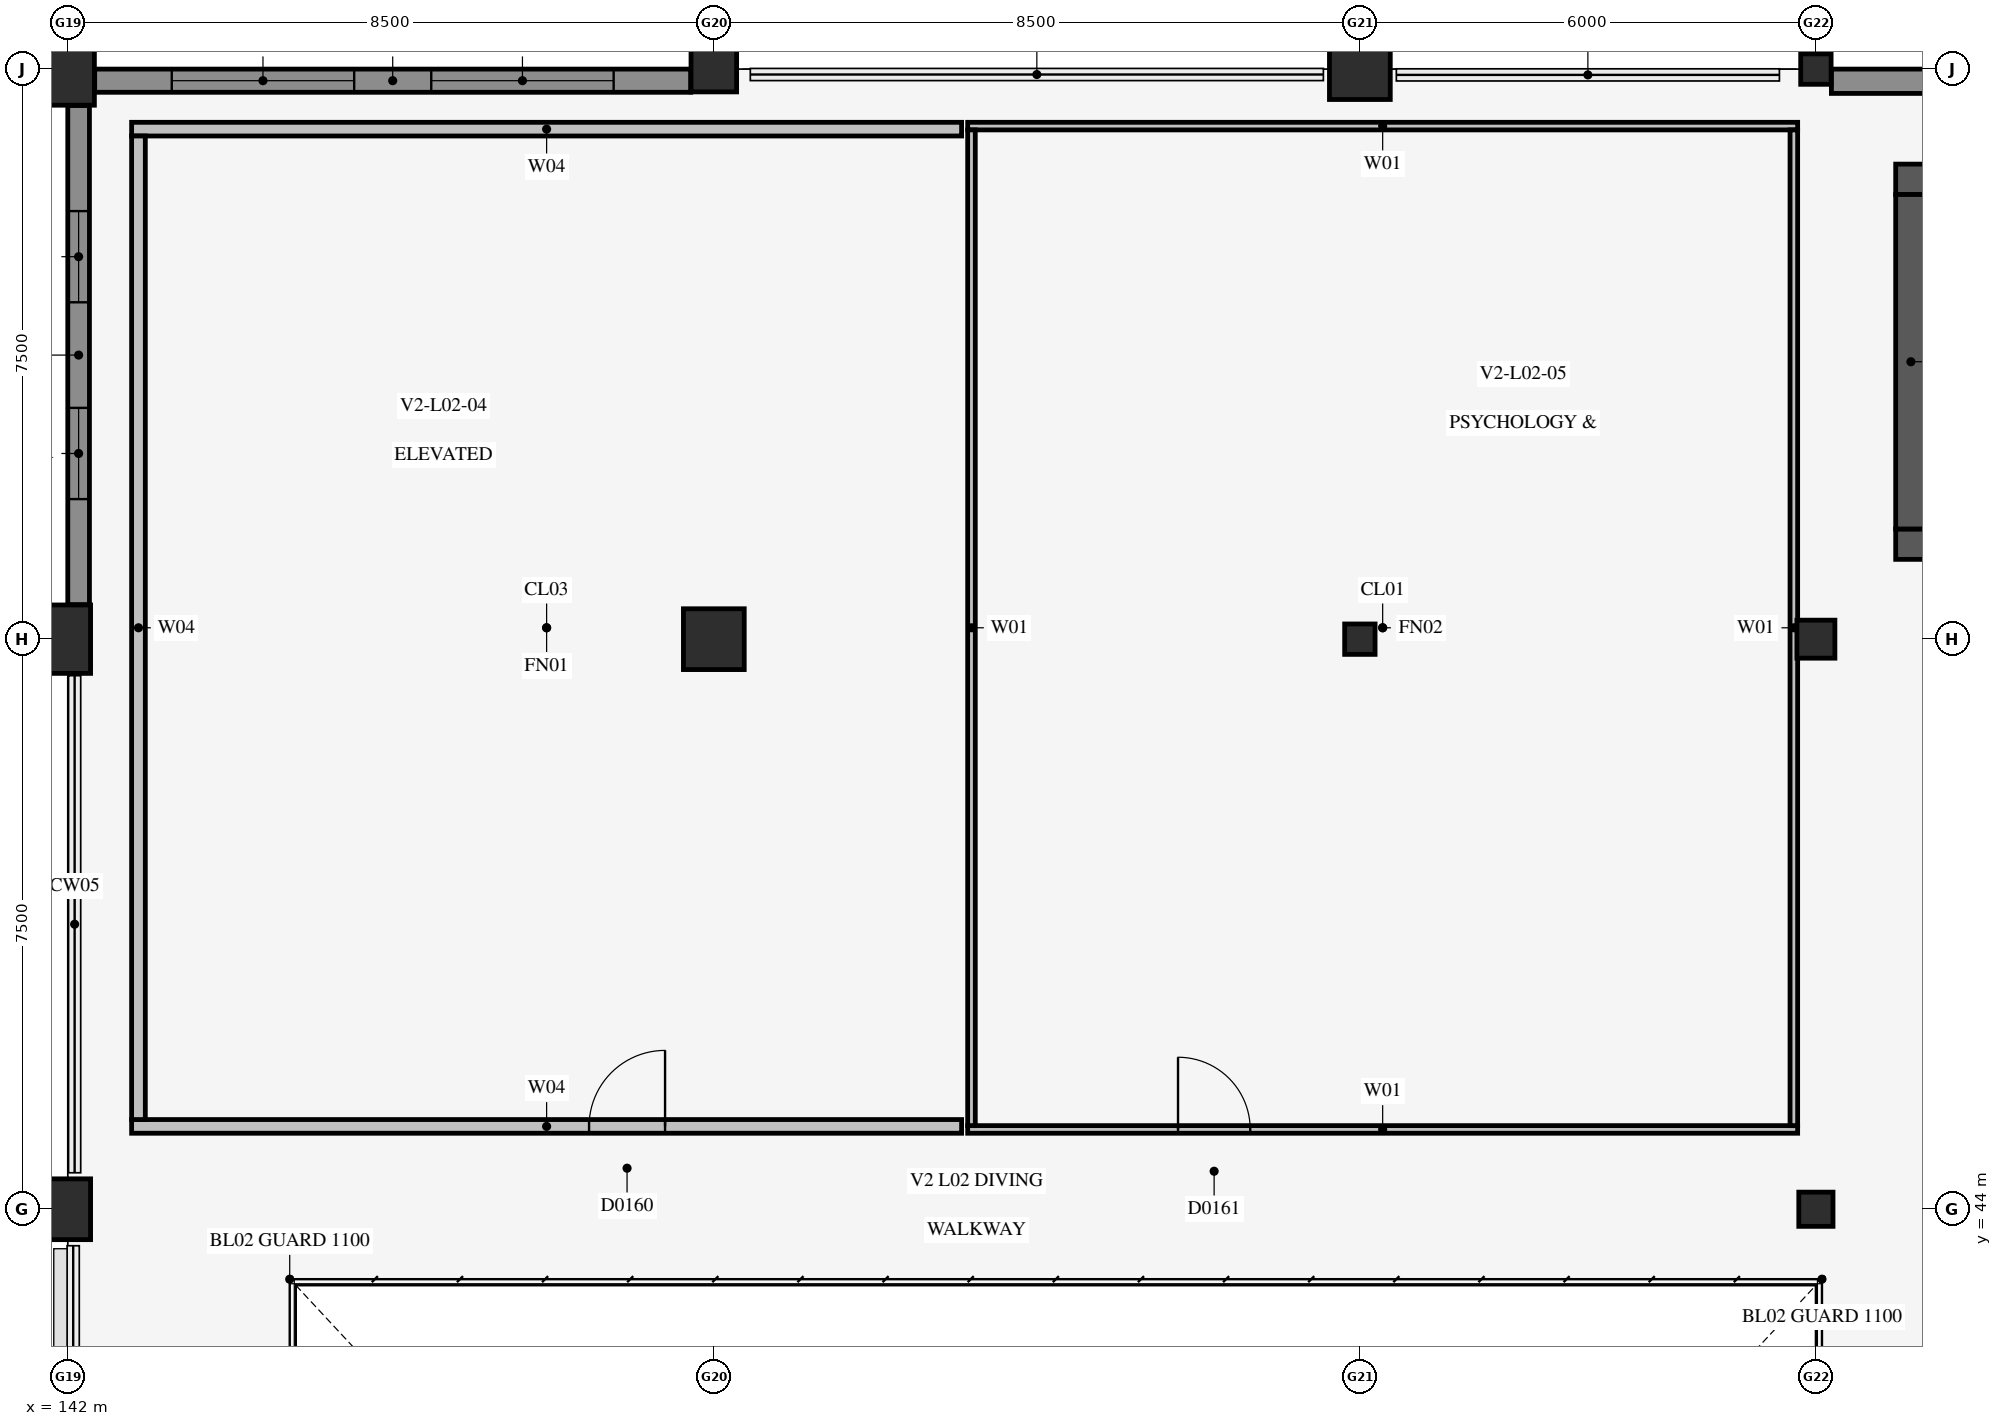
"""IFC4 building model, lengths in metres.
Left out: names, types, materials, properties, quantities, classifications, styles, units other than length and angle.
Written with IfcOpenShell. Run it as: python <this file> out.ifc"""

import sys

from ifc_helpers import new_model, si_unit, direction, frame, frame_2d, origin, origin_2d, place, context, subcontext, project, spatial, rectangle, circle, extrude, element, fill, save


model = new_model("IFC4")
c1 = context("Model", 3, precision=1e-05, world=origin(), true_north=direction((0.0, 1.0)))
c2 = subcontext(c1, "Body", "Model", "MODEL_VIEW")
j1 = project(units=[si_unit("LENGTHUNIT", "METRE"), si_unit("PLANEANGLEUNIT", "RADIAN")], contexts=[c1])
p1 = place(None, origin())
s1 = spatial("IfcSite", under=j1, at=p1, CompositionType="ELEMENT")
p2 = place(p1, origin())
s2 = spatial("IfcBuilding", under=s1, at=p2, CompositionType="ELEMENT")
p3 = place(p2, frame((0.0, 0.0, 10.2)))
s3 = spatial("IfcBuildingStorey", under=s2, at=p3, CompositionType="ELEMENT", Elevation=10.2)
p4 = place(p3, frame((166.05, 52.75, 0.0), z_axis=(0.0, 0.0, 1.0), x_axis=(1.0, 0.0, 0.0)))
e1 = element("IfcWall", 1, at=p4, inside=s3, PredefinedType="SHEAR", context=c2, shape_type="SweptSolid", body=[
    extrude(rectangle(XDim=9.5, YDim=0.4, at=frame_2d((4.75, 0.0))), origin(), (0.0, 0.0, 1.0), 4.38),
])
p5 = place(p4, frame((0.48, 0.0, 0.0)))
e2 = element("IfcOpeningElement", 2, at=p5, cuts=e1, PredefinedType="OPENING", context=c2, shape_type="SweptSolid", body=[
    extrude(rectangle(XDim=1.5, YDim=2.3, at=frame_2d((0.75, 1.15))), frame((0.0, 0.212, 0.0), z_axis=(0.0, -1.0, 0.0), x_axis=(1.0, 0.0, 0.0)), (0.0, 0.0, 1.0), 0.424),
])
p6 = place(p3, frame((166.05, 57.55, 0.0), z_axis=(0.0, 0.0, 1.0), x_axis=(1.0, 0.0, 0.0)))
e3 = element("IfcWall", 3, at=p6, inside=s3, PredefinedType="SHEAR", context=c2, shape_type="SweptSolid", body=[
    extrude(rectangle(XDim=9.5, YDim=0.4, at=frame_2d((4.75, 0.0))), origin(), (0.0, 0.0, 1.0), 4.38),
])
p7 = place(p3, frame((166.25, 52.95, 0.0), z_axis=(0.0, 0.0, 1.0), x_axis=(0.0, 1.0, 0.0)))
e4 = element("IfcWall", 4, at=p7, inside=s3, PredefinedType="SHEAR", context=c2, shape_type="SweptSolid", body=[
    extrude(rectangle(XDim=4.4, YDim=0.4, at=frame_2d((2.2, 0.0))), origin(), (0.0, 0.0, 1.0), 4.38),
])
p8 = place(p3, frame((142.0, 44.0, 0.0), z_axis=(0.0, 0.0, 1.0), x_axis=(1.0, 0.0, 0.0)))
e5 = element("IfcColumn", 5, at=p8, inside=s3, PredefinedType="COLUMN", context=c2, shape_type="SweptSolid", body=[
    extrude(rectangle(XDim=0.6, YDim=0.8, at=origin_2d()), origin(), (0.0, 0.0, 1.0), 4.6),
])
p9 = place(p3, frame((142.0, 51.5, 0.0), z_axis=(0.0, 0.0, 1.0), x_axis=(1.0, 0.0, 0.0)))
e6 = element("IfcColumn", 6, at=p9, inside=s3, PredefinedType="COLUMN", context=c2, shape_type="SweptSolid", body=[
    extrude(rectangle(XDim=0.6, YDim=0.9, at=origin_2d()), origin(), (0.0, 0.0, 1.0), 4.6),
])
p10 = place(p3, frame((142.0, 59.0, 0.0), z_axis=(0.0, 0.0, 1.0), x_axis=(1.0, 0.0, 0.0)))
e7 = element("IfcColumn", 7, at=p10, inside=s3, PredefinedType="COLUMN", context=c2, shape_type="SweptSolid", body=[
    extrude(rectangle(XDim=0.7, YDim=0.95, at=origin_2d()), origin(), (0.0, 0.0, 1.0), 4.6),
])
p11 = place(p3, frame((150.5, 51.5, 0.0), z_axis=(0.0, 0.0, 1.0), x_axis=(1.0, 0.0, 0.0)))
e8 = element("IfcColumn", 8, at=p11, inside=s3, PredefinedType="COLUMN", context=c2, shape_type="SweptSolid", body=[
    extrude(circle(Radius=0.4, at=origin_2d()), origin(), (0.0, 0.0, 1.0), 4.6),
])
p12 = place(p3, frame((150.5, 59.0, 0.0), z_axis=(0.0, 0.0, 1.0), x_axis=(1.0, 0.0, 0.0)))
e9 = element("IfcColumn", 9, at=p12, inside=s3, PredefinedType="COLUMN", context=c2, shape_type="SweptSolid", body=[
    extrude(circle(Radius=0.3, at=origin_2d()), origin(), (0.0, 0.0, 1.0), 4.6),
])
p13 = place(p3, frame((159.0, 51.5, 0.0), z_axis=(0.0, 0.0, 1.0), x_axis=(1.0, 0.0, 0.0)))
e10 = element("IfcColumn", 10, at=p13, inside=s3, PredefinedType="COLUMN", context=c2, shape_type="SweptSolid", body=[
    extrude(rectangle(XDim=0.4, YDim=0.4, at=origin_2d()), origin(), (0.0, 0.0, 1.0), 4.6),
])
p14 = place(p3, frame((159.0, 59.0, 0.0), z_axis=(0.0, 0.0, 1.0), x_axis=(1.0, 0.0, 0.0)))
e11 = element("IfcColumn", 11, at=p14, inside=s3, PredefinedType="COLUMN", context=c2, shape_type="SweptSolid", body=[
    extrude(circle(Radius=0.4, at=origin_2d()), origin(), (0.0, 0.0, 1.0), 4.6),
])
p15 = place(p3, frame((165.0, 44.0, 0.0), z_axis=(0.0, 0.0, 1.0), x_axis=(1.0, 0.0, 0.0)))
e12 = element("IfcColumn", 12, at=p15, inside=s3, PredefinedType="COLUMN", context=c2, shape_type="SweptSolid", body=[
    extrude(rectangle(XDim=0.45, YDim=0.45, at=origin_2d()), origin(), (0.0, 0.0, 1.0), 4.6),
])
p16 = place(p3, frame((165.0, 51.5, 0.0), z_axis=(0.0, 0.0, 1.0), x_axis=(1.0, 0.0, 0.0)))
e13 = element("IfcColumn", 13, at=p16, inside=s3, PredefinedType="COLUMN", context=c2, shape_type="SweptSolid", body=[
    extrude(rectangle(XDim=0.5, YDim=0.5, at=origin_2d()), origin(), (0.0, 0.0, 1.0), 4.6),
])
p17 = place(p3, frame((165.0, 59.0, 0.0), z_axis=(0.0, 0.0, 1.0), x_axis=(1.0, 0.0, 0.0)))
e14 = element("IfcColumn", 14, at=p17, inside=s3, PredefinedType="COLUMN", context=c2, shape_type="SweptSolid", body=[
    extrude(rectangle(XDim=0.4, YDim=0.4, at=origin_2d()), origin(), (0.0, 0.0, 1.0), 4.6),
])
p18 = place(p3, frame((142.84, 45.09, 0.0), z_axis=(0.0, 0.0, 1.0), x_axis=(1.0, 0.0, 0.0)))
e15 = element("IfcWall", 15, at=p18, inside=s3, PredefinedType="PARTITIONING", context=c2, shape_type="SweptSolid", body=[
    extrude(rectangle(XDim=10.92, YDim=0.18, at=frame_2d((5.46, 0.0))), origin(), (0.0, 0.0, 1.0), 4.365),
])
p19 = place(p18, frame((6.018, 0.0, 0.0)))
e16 = element("IfcOpeningElement", 16, at=p19, cuts=e15, PredefinedType="OPENING", context=c2, shape_type="SweptSolid", body=[
    extrude(rectangle(XDim=1.0, YDim=2.2, at=frame_2d((0.5, 1.1))), frame((0.0, 0.102, 0.0), z_axis=(0.0, -1.0, 0.0), x_axis=(1.0, 0.0, 0.0)), (0.0, 0.0, 1.0), 0.204),
])
p20 = place(p3, frame((142.84, 58.21, 0.0), z_axis=(0.0, 0.0, 1.0), x_axis=(1.0, 0.0, 0.0)))
e17 = element("IfcWall", 17, at=p20, inside=s3, PredefinedType="PARTITIONING", context=c2, shape_type="SweptSolid", body=[
    extrude(rectangle(XDim=10.92, YDim=0.18, at=frame_2d((5.46, 0.0))), origin(), (0.0, 0.0, 1.0), 4.365),
])
p21 = place(p3, frame((142.93, 45.18, 0.0), z_axis=(0.0, 0.0, 1.0), x_axis=(0.0, 1.0, 0.0)))
e18 = element("IfcWall", 18, at=p21, inside=s3, PredefinedType="PARTITIONING", context=c2, shape_type="SweptSolid", body=[
    extrude(rectangle(XDim=12.94, YDim=0.18, at=frame_2d((6.47, 0.0))), origin(), (0.0, 0.0, 1.0), 4.365),
])
p22 = place(p3, frame((153.84, 45.05, 0.0), z_axis=(0.0, 0.0, 1.0), x_axis=(1.0, 0.0, 0.0)))
e19 = element("IfcWall", 19, at=p22, inside=s3, PredefinedType="PARTITIONING", context=c2, shape_type="SweptSolid", body=[
    extrude(rectangle(XDim=10.92, YDim=0.1, at=frame_2d((5.46, 0.0))), origin(), (0.0, 0.0, 1.0), 4.365),
])
p23 = place(p22, frame((2.768, 0.0, 0.0)))
e20 = element("IfcOpeningElement", 20, at=p23, cuts=e19, PredefinedType="OPENING", context=c2, shape_type="SweptSolid", body=[
    extrude(rectangle(XDim=0.95, YDim=2.15, at=frame_2d((0.475, 1.075))), frame((0.0, 0.062, 0.0), z_axis=(0.0, -1.0, 0.0), x_axis=(1.0, 0.0, 0.0)), (0.0, 0.0, 1.0), 0.124),
])
p24 = place(p3, frame((153.84, 58.25, 0.0), z_axis=(0.0, 0.0, 1.0), x_axis=(1.0, 0.0, 0.0)))
e21 = element("IfcWall", 21, at=p24, inside=s3, PredefinedType="PARTITIONING", context=c2, shape_type="SweptSolid", body=[
    extrude(rectangle(XDim=10.92, YDim=0.1, at=frame_2d((5.46, 0.0))), origin(), (0.0, 0.0, 1.0), 4.365),
])
for number, where, z_axis, x_axis in (
    (22, (164.71, 45.1, 0.0), (0.0, 0.0, 1.0), (0.0, 1.0, 0.0)),
    (23, (153.89, 45.1, 0.0), (0.0, 0.0, 1.0), (0.0, 1.0, 0.0)),
):
    element("IfcWall", number, at=place(p3, frame(where, z_axis=z_axis, x_axis=x_axis)), inside=s3, PredefinedType="PARTITIONING", context=c2, shape_type="SweptSolid", body=[
        extrude(rectangle(XDim=13.1, YDim=0.1, at=frame_2d((6.55, 0.0))), origin(), (0.0, 0.0, 1.0), 4.365),
    ])
p25 = place(p3, frame((142.354, 58.847, 0.0), z_axis=(0.0, 0.0, 1.0), x_axis=(1.0, 0.0, 0.0)))
e24 = element("IfcWall", 24, at=p25, inside=s3, PredefinedType="SOLIDWALL", context=c2, shape_type="SweptSolid", body=[
    extrude(rectangle(XDim=7.842, YDim=0.305, at=frame_2d((3.921, 0.0))), origin(), (0.0, 0.0, 1.0), 3.937),
])
p26 = place(p25, frame((1.014, 0.0, 0.95)))
e25 = element("IfcOpeningElement", 25, at=p26, cuts=e24, PredefinedType="OPENING", context=c2, shape_type="SweptSolid", body=[
    extrude(rectangle(XDim=2.4, YDim=1.2, at=frame_2d((1.2, 0.6))), frame((0.0, 0.165, 0.0), z_axis=(0.0, -1.0, 0.0), x_axis=(1.0, 0.0, 0.0)), (0.0, 0.0, 1.0), 0.329),
])
p27 = place(p25, frame((4.428, 0.0, 0.95)))
e26 = element("IfcOpeningElement", 26, at=p27, cuts=e24, PredefinedType="OPENING", context=c2, shape_type="SweptSolid", body=[
    extrude(rectangle(XDim=2.4, YDim=1.2, at=frame_2d((1.2, 0.6))), frame((0.0, 0.165, 0.0), z_axis=(0.0, -1.0, 0.0), x_axis=(1.0, 0.0, 0.0)), (0.0, 0.0, 1.0), 0.329),
])
p28 = place(p3, frame((165.204, 58.84, 0.0), z_axis=(0.0, 0.0, 1.0), x_axis=(1.0, 0.0, 0.0)))
e27 = element("IfcWall", 27, at=p28, inside=s3, PredefinedType="SOLIDWALL", context=c2, shape_type="SweptSolid", body=[
    extrude(rectangle(XDim=10.542, YDim=0.32, at=frame_2d((5.271, 0.0))), origin(), (0.0, 0.0, 1.0), 3.738),
])
p29 = place(p28, frame((2.114, 0.0, 0.95)))
e28 = element("IfcOpeningElement", 28, at=p29, cuts=e27, PredefinedType="OPENING", context=c2, shape_type="SweptSolid", body=[
    extrude(rectangle(XDim=2.1, YDim=1.5, at=frame_2d((1.05, 0.75))), frame((0.0, 0.172, 0.0), z_axis=(0.0, -1.0, 0.0), x_axis=(1.0, 0.0, 0.0)), (0.0, 0.0, 1.0), 0.344),
])
p30 = place(p28, frame((6.328, 0.0, 0.95)))
e29 = element("IfcOpeningElement", 29, at=p30, cuts=e27, PredefinedType="OPENING", context=c2, shape_type="SweptSolid", body=[
    extrude(rectangle(XDim=2.1, YDim=1.5, at=frame_2d((1.05, 0.75))), frame((0.0, 0.172, 0.0), z_axis=(0.0, -1.0, 0.0), x_axis=(1.0, 0.0, 0.0)), (0.0, 0.0, 1.0), 0.344),
])
p31 = place(p3, frame((142.143, 51.954, 0.0), z_axis=(0.0, 0.0, 1.0), x_axis=(0.0, 1.0, 0.0)))
e30 = element("IfcWall", 30, at=p31, inside=s3, PredefinedType="SOLIDWALL", context=c2, shape_type="SweptSolid", body=[
    extrude(rectangle(XDim=6.567, YDim=0.285, at=frame_2d((3.283, 0.0))), origin(), (0.0, 0.0, 1.0), 3.937),
])
p32 = place(p31, frame((1.389, 0.0, 0.95)))
e31 = element("IfcOpeningElement", 31, at=p32, cuts=e30, PredefinedType="OPENING", context=c2, shape_type="SweptSolid", body=[
    extrude(rectangle(XDim=1.2, YDim=1.2, at=frame_2d((0.6, 0.6))), frame((0.0, 0.154, 0.0), z_axis=(0.0, -1.0, 0.0), x_axis=(1.0, 0.0, 0.0)), (0.0, 0.0, 1.0), 0.309),
])
p33 = place(p31, frame((3.978, 0.0, 0.95)))
e32 = element("IfcOpeningElement", 32, at=p33, cuts=e30, PredefinedType="OPENING", context=c2, shape_type="SweptSolid", body=[
    extrude(rectangle(XDim=1.2, YDim=1.2, at=frame_2d((0.6, 0.6))), frame((0.0, 0.154, 0.0), z_axis=(0.0, -1.0, 0.0), x_axis=(1.0, 0.0, 0.0)), (0.0, 0.0, 1.0), 0.309),
])
p34 = place(p19, origin())
e33 = element("IfcDoor", 33, at=p34, inside=s3, OperationType="SINGLE_SWING_RIGHT", PredefinedType="DOOR", context=c2, shape_type="SweptSolid", body=[
    extrude(rectangle(XDim=1.0, YDim=2.2, at=frame_2d((0.5, 1.1))), frame((0.0, 0.025, 0.0), z_axis=(0.0, -1.0, 0.0), x_axis=(1.0, 0.0, 0.0)), (0.0, 0.0, 1.0), 0.05),
])
fill(e16, e33)
p35 = place(p23, origin())
e34 = element("IfcDoor", 34, at=p35, inside=s3, OperationType="SINGLE_SWING_LEFT", PredefinedType="DOOR", context=c2, shape_type="SweptSolid", body=[
    extrude(rectangle(XDim=0.95, YDim=2.15, at=frame_2d((0.475, 1.075))), frame((0.0, 0.025, 0.0), z_axis=(0.0, -1.0, 0.0), x_axis=(1.0, 0.0, 0.0)), (0.0, 0.0, 1.0), 0.05),
])
fill(e20, e34)
p36 = place(p26, origin())
e35 = element("IfcWindow", 35, at=p36, inside=s3, PartitioningType="SINGLE_PANEL", PredefinedType="WINDOW", context=c2, shape_type="SweptSolid", body=[
    extrude(rectangle(XDim=2.4, YDim=1.2, at=frame_2d((1.2, 0.6))), frame((0.0, 0.03, 0.0), z_axis=(0.0, -1.0, 0.0), x_axis=(1.0, 0.0, 0.0)), (0.0, 0.0, 1.0), 0.06),
])
fill(e25, e35)
p37 = place(p27, origin())
e36 = element("IfcWindow", 36, at=p37, inside=s3, PartitioningType="SINGLE_PANEL", PredefinedType="WINDOW", context=c2, shape_type="SweptSolid", body=[
    extrude(rectangle(XDim=2.4, YDim=1.2, at=frame_2d((1.2, 0.6))), frame((0.0, 0.03, 0.0), z_axis=(0.0, -1.0, 0.0), x_axis=(1.0, 0.0, 0.0)), (0.0, 0.0, 1.0), 0.06),
])
fill(e26, e36)
p38 = place(p32, origin())
e37 = element("IfcWindow", 37, at=p38, inside=s3, PartitioningType="SINGLE_PANEL", PredefinedType="WINDOW", context=c2, shape_type="SweptSolid", body=[
    extrude(rectangle(XDim=1.2, YDim=1.2, at=frame_2d((0.6, 0.6))), frame((0.0, 0.03, 0.0), z_axis=(0.0, -1.0, 0.0), x_axis=(1.0, 0.0, 0.0)), (0.0, 0.0, 1.0), 0.06),
])
fill(e31, e37)
p39 = place(p33, origin())
e38 = element("IfcWindow", 38, at=p39, inside=s3, PartitioningType="SINGLE_PANEL", PredefinedType="WINDOW", context=c2, shape_type="SweptSolid", body=[
    extrude(rectangle(XDim=1.2, YDim=1.2, at=frame_2d((0.6, 0.6))), frame((0.0, 0.03, 0.0), z_axis=(0.0, -1.0, 0.0), x_axis=(1.0, 0.0, 0.0)), (0.0, 0.0, 1.0), 0.06),
])
fill(e32, e38)
save(model, sys.argv[1])
